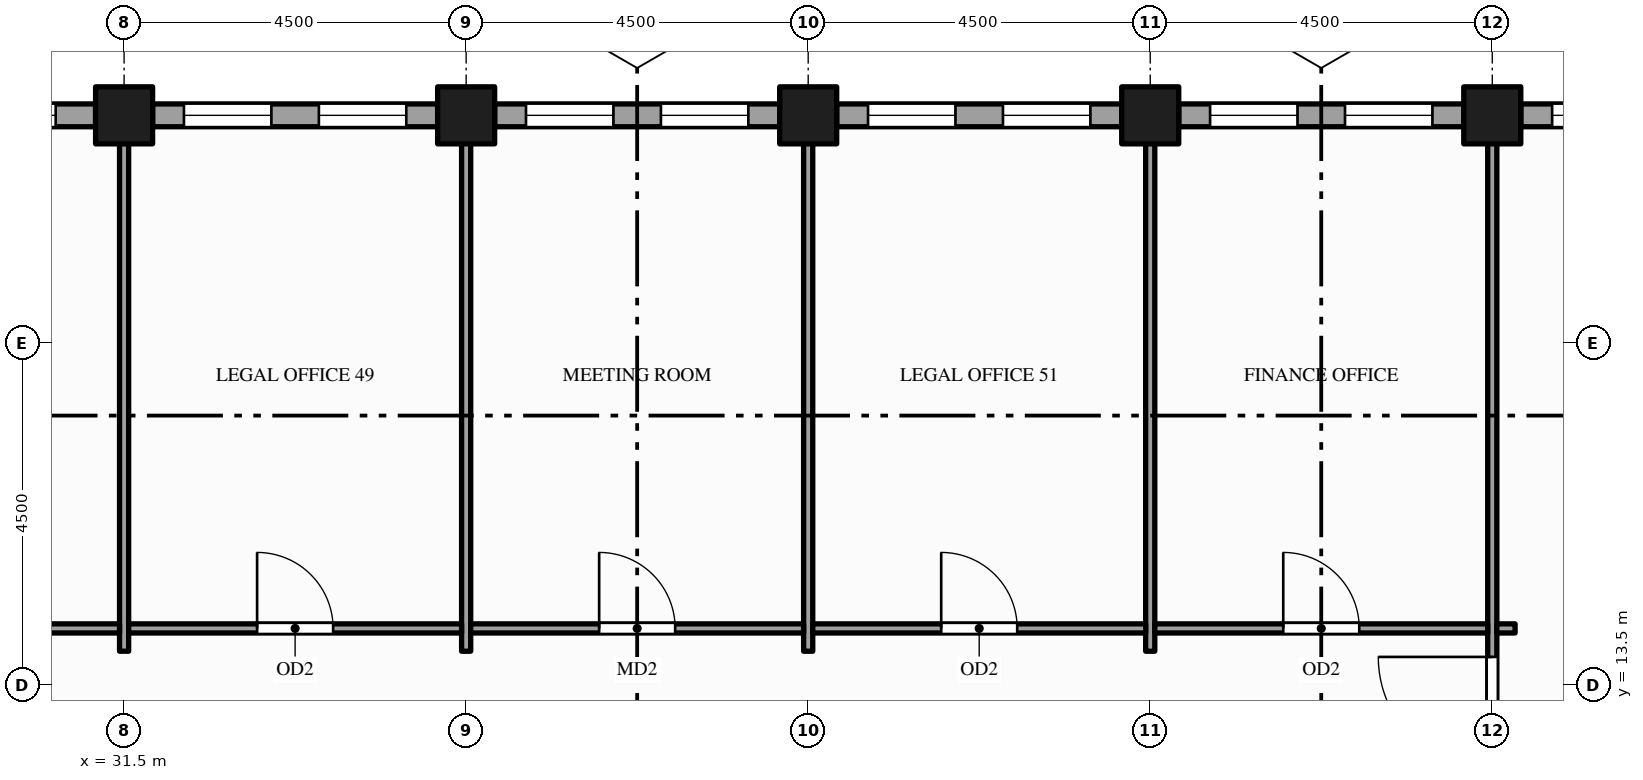
"""IFC4 building model, lengths in metres.
Left out: names, types, materials, properties, quantities, classifications, styles, units other than length and angle.
Written with IfcOpenShell. Run it as: python <this file> out.ifc"""

import sys

from ifc_helpers import new_model, si_unit, direction, frame, frame_2d, origin, origin_2d, place, context, subcontext, project, spatial, rectangle, hollow_rectangle, extrude, element, fill, save


model = new_model("IFC4")
c1 = context("Model", 3, precision=1e-05, world=origin(), true_north=direction((0.0, 1.0)))
c2 = subcontext(c1, "Body", "Model", "MODEL_VIEW")
j1 = project(units=[si_unit("LENGTHUNIT", "METRE"), si_unit("PLANEANGLEUNIT", "RADIAN")], contexts=[c1])
p1 = place(None, origin())
s1 = spatial("IfcSite", under=j1, at=p1, CompositionType="ELEMENT")
p2 = place(p1, origin())
s2 = spatial("IfcBuilding", under=s1, at=p2, CompositionType="ELEMENT")
p3 = place(p2, frame((0.0, 0.0, 235.0)))
s3 = spatial("IfcBuildingStorey", under=s2, at=p3, CompositionType="ELEMENT", Elevation=235.0)
for number, where, z_axis, x_axis in (
    (1, (31.5, 21.0, -0.15), (0.0, 0.0, 1.0), (1.0, 0.0, 0.0)),
    (2, (36.0, 21.0, -0.15), (0.0, 0.0, 1.0), (1.0, 0.0, 0.0)),
    (3, (40.5, 21.0, -0.15), (0.0, 0.0, 1.0), (1.0, 0.0, 0.0)),
    (4, (45.0, 21.0, -0.15), (0.0, 0.0, 1.0), (1.0, 0.0, 0.0)),
    (5, (49.5, 21.0, -0.15), (0.0, 0.0, 1.0), (1.0, 0.0, 0.0)),
):
    element("IfcColumn", number, at=place(p3, frame(where, z_axis=z_axis, x_axis=x_axis)), inside=s3, PredefinedType="COLUMN", context=c2, shape_type="SweptSolid", body=[
        extrude(hollow_rectangle(XDim=0.75, YDim=0.75, WallThickness=0.036, at=origin_2d()), origin(), (0.0, 0.0, 1.0), 4.0),
    ])
p4 = place(p3, frame((54.0, 21.0, 0.0), z_axis=(0.0, 0.0, 1.0), x_axis=(-1.0, 0.0, 0.0)))
e6 = element("IfcWall", 6, at=p4, inside=s3, PredefinedType="STANDARD", context=c2, shape_type="SweptSolid", body=[
    extrude(rectangle(XDim=4.125, YDim=0.3, at=frame_2d((2.062, 0.0))), origin(), (0.0, 0.0, 1.0), 2.87),
])
p5 = place(p4, frame((0.4, 0.0, 0.9)))
e7 = element("IfcOpeningElement", 7, at=p5, cuts=e6, PredefinedType="OPENING", context=c2, shape_type="SweptSolid", body=[
    extrude(rectangle(XDim=1.55, YDim=1.75, at=frame_2d((0.775, 0.875))), frame((0.0, 0.16, 0.0), z_axis=(0.0, -1.0, 0.0), x_axis=(1.0, 0.0, 0.0)), (0.0, 0.0, 1.0), 0.32),
])
p6 = place(p4, frame((2.562, 0.0, 0.9)))
e8 = element("IfcOpeningElement", 8, at=p6, cuts=e6, PredefinedType="OPENING", context=c2, shape_type="SweptSolid", body=[
    extrude(rectangle(XDim=1.15, YDim=1.75, at=frame_2d((0.575, 0.875))), frame((0.0, 0.16, 0.0), z_axis=(0.0, -1.0, 0.0), x_axis=(1.0, 0.0, 0.0)), (0.0, 0.0, 1.0), 0.32),
])
p7 = place(p3, frame((49.125, 21.0, 0.0), z_axis=(0.0, 0.0, 1.0), x_axis=(-1.0, 0.0, 0.0)))
e9 = element("IfcWall", 9, at=p7, inside=s3, PredefinedType="STANDARD", context=c2, shape_type="SweptSolid", body=[
    extrude(rectangle(XDim=3.75, YDim=0.3, at=frame_2d((1.875, 0.0))), origin(), (0.0, 0.0, 1.0), 2.87),
])
p8 = place(p7, frame((0.413, 0.0, 0.9)))
e10 = element("IfcOpeningElement", 10, at=p8, cuts=e9, PredefinedType="OPENING", context=c2, shape_type="SweptSolid", body=[
    extrude(rectangle(XDim=1.15, YDim=1.75, at=frame_2d((0.575, 0.875))), frame((0.0, 0.16, 0.0), z_axis=(0.0, -1.0, 0.0), x_axis=(1.0, 0.0, 0.0)), (0.0, 0.0, 1.0), 0.32),
])
p9 = place(p7, frame((2.188, 0.0, 0.9)))
e11 = element("IfcOpeningElement", 11, at=p9, cuts=e9, PredefinedType="OPENING", context=c2, shape_type="SweptSolid", body=[
    extrude(rectangle(XDim=1.15, YDim=1.75, at=frame_2d((0.575, 0.875))), frame((0.0, 0.16, 0.0), z_axis=(0.0, -1.0, 0.0), x_axis=(1.0, 0.0, 0.0)), (0.0, 0.0, 1.0), 0.32),
])
p10 = place(p3, frame((44.625, 21.0, 0.0), z_axis=(0.0, 0.0, 1.0), x_axis=(-1.0, 0.0, 0.0)))
e12 = element("IfcWall", 12, at=p10, inside=s3, PredefinedType="STANDARD", context=c2, shape_type="SweptSolid", body=[
    extrude(rectangle(XDim=3.75, YDim=0.3, at=frame_2d((1.875, 0.0))), origin(), (0.0, 0.0, 1.0), 2.87),
])
p11 = place(p10, frame((0.413, 0.0, 0.9)))
e13 = element("IfcOpeningElement", 13, at=p11, cuts=e12, PredefinedType="OPENING", context=c2, shape_type="SweptSolid", body=[
    extrude(rectangle(XDim=1.15, YDim=1.75, at=frame_2d((0.575, 0.875))), frame((0.0, 0.16, 0.0), z_axis=(0.0, -1.0, 0.0), x_axis=(1.0, 0.0, 0.0)), (0.0, 0.0, 1.0), 0.32),
])
p12 = place(p10, frame((2.188, 0.0, 0.9)))
e14 = element("IfcOpeningElement", 14, at=p12, cuts=e12, PredefinedType="OPENING", context=c2, shape_type="SweptSolid", body=[
    extrude(rectangle(XDim=1.15, YDim=1.75, at=frame_2d((0.575, 0.875))), frame((0.0, 0.16, 0.0), z_axis=(0.0, -1.0, 0.0), x_axis=(1.0, 0.0, 0.0)), (0.0, 0.0, 1.0), 0.32),
])
p13 = place(p3, frame((40.125, 21.0, 0.0), z_axis=(0.0, 0.0, 1.0), x_axis=(-1.0, 0.0, 0.0)))
e15 = element("IfcWall", 15, at=p13, inside=s3, PredefinedType="STANDARD", context=c2, shape_type="SweptSolid", body=[
    extrude(rectangle(XDim=3.75, YDim=0.3, at=frame_2d((1.875, 0.0))), origin(), (0.0, 0.0, 1.0), 2.87),
])
p14 = place(p13, frame((0.413, 0.0, 0.9)))
e16 = element("IfcOpeningElement", 16, at=p14, cuts=e15, PredefinedType="OPENING", context=c2, shape_type="SweptSolid", body=[
    extrude(rectangle(XDim=1.15, YDim=1.75, at=frame_2d((0.575, 0.875))), frame((0.0, 0.16, 0.0), z_axis=(0.0, -1.0, 0.0), x_axis=(1.0, 0.0, 0.0)), (0.0, 0.0, 1.0), 0.32),
])
p15 = place(p13, frame((2.188, 0.0, 0.9)))
e17 = element("IfcOpeningElement", 17, at=p15, cuts=e15, PredefinedType="OPENING", context=c2, shape_type="SweptSolid", body=[
    extrude(rectangle(XDim=1.15, YDim=1.75, at=frame_2d((0.575, 0.875))), frame((0.0, 0.16, 0.0), z_axis=(0.0, -1.0, 0.0), x_axis=(1.0, 0.0, 0.0)), (0.0, 0.0, 1.0), 0.32),
])
p16 = place(p3, frame((35.625, 21.0, 0.0), z_axis=(0.0, 0.0, 1.0), x_axis=(-1.0, 0.0, 0.0)))
e18 = element("IfcWall", 18, at=p16, inside=s3, PredefinedType="STANDARD", context=c2, shape_type="SweptSolid", body=[
    extrude(rectangle(XDim=3.75, YDim=0.3, at=frame_2d((1.875, 0.0))), origin(), (0.0, 0.0, 1.0), 2.87),
])
p17 = place(p16, frame((0.413, 0.0, 0.9)))
e19 = element("IfcOpeningElement", 19, at=p17, cuts=e18, PredefinedType="OPENING", context=c2, shape_type="SweptSolid", body=[
    extrude(rectangle(XDim=1.15, YDim=1.75, at=frame_2d((0.575, 0.875))), frame((0.0, 0.16, 0.0), z_axis=(0.0, -1.0, 0.0), x_axis=(1.0, 0.0, 0.0)), (0.0, 0.0, 1.0), 0.32),
])
p18 = place(p16, frame((2.188, 0.0, 0.9)))
e20 = element("IfcOpeningElement", 20, at=p18, cuts=e18, PredefinedType="OPENING", context=c2, shape_type="SweptSolid", body=[
    extrude(rectangle(XDim=1.15, YDim=1.75, at=frame_2d((0.575, 0.875))), frame((0.0, 0.16, 0.0), z_axis=(0.0, -1.0, 0.0), x_axis=(1.0, 0.0, 0.0)), (0.0, 0.0, 1.0), 0.32),
])
p19 = place(p3, frame((31.125, 21.0, 0.0), z_axis=(0.0, 0.0, 1.0), x_axis=(-1.0, 0.0, 0.0)))
e21 = element("IfcWall", 21, at=p19, inside=s3, PredefinedType="STANDARD", context=c2, shape_type="SweptSolid", body=[
    extrude(rectangle(XDim=2.25, YDim=0.3, at=frame_2d((1.125, 0.0))), origin(), (0.0, 0.0, 1.0), 2.87),
])
p20 = place(p19, frame((0.525, 0.0, 0.9)))
e22 = element("IfcOpeningElement", 22, at=p20, cuts=e21, PredefinedType="OPENING", context=c2, shape_type="SweptSolid", body=[
    extrude(rectangle(XDim=1.2, YDim=1.75, at=frame_2d((0.6, 0.875))), frame((0.0, 0.16, 0.0), z_axis=(0.0, -1.0, 0.0), x_axis=(1.0, 0.0, 0.0)), (0.0, 0.0, 1.0), 0.32),
])
for number, where, z_axis, x_axis in (
    (23, (31.5, 13.95, 0.0), (0.0, 0.0, 1.0), (0.0, 1.0, 0.0)),
    (24, (36.0, 13.95, 0.0), (0.0, 0.0, 1.0), (0.0, 1.0, 0.0)),
    (25, (40.5, 13.95, 0.0), (0.0, 0.0, 1.0), (0.0, 1.0, 0.0)),
    (26, (45.0, 13.95, 0.0), (0.0, 0.0, 1.0), (0.0, 1.0, 0.0)),
):
    element("IfcWall", number, at=place(p3, frame(where, z_axis=z_axis, x_axis=x_axis)), inside=s3, PredefinedType="PARTITIONING", context=c2, shape_type="SweptSolid", body=[
        extrude(rectangle(XDim=6.9, YDim=0.12, at=frame_2d((3.45, 0.0))), origin(), (0.0, 0.0, 1.0), 2.87),
    ])
p21 = place(p3, frame((49.5, -1.35, 0.0), z_axis=(0.0, 0.0, 1.0), x_axis=(0.0, 1.0, 0.0)))
e27 = element("IfcWall", 27, at=p21, inside=s3, PredefinedType="PARTITIONING", context=c2, shape_type="SweptSolid", body=[
    extrude(rectangle(XDim=22.2, YDim=0.12, at=frame_2d((11.1, 0.0))), origin(), (0.0, 0.0, 1.0), 2.87),
])
p22 = place(p21, frame((6.975, 0.0, 0.0)))
e28 = element("IfcOpeningElement", 28, at=p22, cuts=e27, PredefinedType="OPENING", context=c2, shape_type="SweptSolid", body=[
    extrude(rectangle(XDim=1.5, YDim=2.1, at=frame_2d((0.75, 1.05))), frame((0.0, 0.07, 0.0), z_axis=(0.0, -1.0, 0.0), x_axis=(1.0, 0.0, 0.0)), (0.0, 0.0, 1.0), 0.14),
])
p23 = place(p21, frame((13.725, 0.0, 0.0)))
e29 = element("IfcOpeningElement", 29, at=p23, cuts=e27, PredefinedType="OPENING", context=c2, shape_type="SweptSolid", body=[
    extrude(rectangle(XDim=1.5, YDim=2.1, at=frame_2d((0.75, 1.05))), frame((0.0, 0.07, 0.0), z_axis=(0.0, -1.0, 0.0), x_axis=(1.0, 0.0, 0.0)), (0.0, 0.0, 1.0), 0.14),
])
p24 = place(p21, frame((9.29, 0.0, 0.0)))
e30 = element("IfcOpeningElement", 30, at=p24, cuts=e27, PredefinedType="OPENING", context=c2, shape_type="SweptSolid", body=[
    extrude(rectangle(XDim=0.9, YDim=2.1, at=frame_2d((0.45, 1.05))), frame((0.0, 0.07, 0.0), z_axis=(0.0, -1.0, 0.0), x_axis=(1.0, 0.0, 0.0)), (0.0, 0.0, 1.0), 0.14),
])
p25 = place(p21, frame((10.65, 0.0, 0.0)))
e31 = element("IfcOpeningElement", 31, at=p25, cuts=e27, PredefinedType="OPENING", context=c2, shape_type="SweptSolid", body=[
    extrude(rectangle(XDim=0.9, YDim=2.1, at=frame_2d((0.45, 1.05))), frame((0.0, 0.07, 0.0), z_axis=(0.0, -1.0, 0.0), x_axis=(1.0, 0.0, 0.0)), (0.0, 0.0, 1.0), 0.14),
])
p26 = place(p21, frame((12.01, 0.0, 0.0)))
e32 = element("IfcOpeningElement", 32, at=p26, cuts=e27, PredefinedType="OPENING", context=c2, shape_type="SweptSolid", body=[
    extrude(rectangle(XDim=1.0, YDim=2.1, at=frame_2d((0.5, 1.05))), frame((0.0, 0.07, 0.0), z_axis=(0.0, -1.0, 0.0), x_axis=(1.0, 0.0, 0.0)), (0.0, 0.0, 1.0), 0.14),
])
p27 = place(p3, frame((27.06, 14.25, 0.0), z_axis=(0.0, 0.0, 1.0), x_axis=(1.0, 0.0, 0.0)))
e33 = element("IfcWall", 33, at=p27, inside=s3, PredefinedType="PARTITIONING", context=c2, shape_type="SweptSolid", body=[
    extrude(rectangle(XDim=4.38, YDim=0.12, at=frame_2d((2.19, 0.0))), origin(), (0.0, 0.0, 1.0), 2.87),
])
p28 = place(p27, frame((1.69, 0.0, 0.0)))
e34 = element("IfcOpeningElement", 34, at=p28, cuts=e33, PredefinedType="OPENING", context=c2, shape_type="SweptSolid", body=[
    extrude(rectangle(XDim=1.0, YDim=2.1, at=frame_2d((0.5, 1.05))), frame((0.0, 0.07, 0.0), z_axis=(0.0, -1.0, 0.0), x_axis=(1.0, 0.0, 0.0)), (0.0, 0.0, 1.0), 0.14),
])
p29 = place(p3, frame((31.56, 14.25, 0.0), z_axis=(0.0, 0.0, 1.0), x_axis=(1.0, 0.0, 0.0)))
e35 = element("IfcWall", 35, at=p29, inside=s3, PredefinedType="PARTITIONING", context=c2, shape_type="SweptSolid", body=[
    extrude(rectangle(XDim=4.38, YDim=0.12, at=frame_2d((2.19, 0.0))), origin(), (0.0, 0.0, 1.0), 2.87),
])
p30 = place(p29, frame((1.69, 0.0, 0.0)))
e36 = element("IfcOpeningElement", 36, at=p30, cuts=e35, PredefinedType="OPENING", context=c2, shape_type="SweptSolid", body=[
    extrude(rectangle(XDim=1.0, YDim=2.1, at=frame_2d((0.5, 1.05))), frame((0.0, 0.07, 0.0), z_axis=(0.0, -1.0, 0.0), x_axis=(1.0, 0.0, 0.0)), (0.0, 0.0, 1.0), 0.14),
])
p31 = place(p3, frame((36.06, 14.25, 0.0), z_axis=(0.0, 0.0, 1.0), x_axis=(1.0, 0.0, 0.0)))
e37 = element("IfcWall", 37, at=p31, inside=s3, PredefinedType="PARTITIONING", context=c2, shape_type="SweptSolid", body=[
    extrude(rectangle(XDim=4.38, YDim=0.12, at=frame_2d((2.19, 0.0))), origin(), (0.0, 0.0, 1.0), 2.87),
])
p32 = place(p31, frame((1.69, 0.0, 0.0)))
e38 = element("IfcOpeningElement", 38, at=p32, cuts=e37, PredefinedType="OPENING", context=c2, shape_type="SweptSolid", body=[
    extrude(rectangle(XDim=1.0, YDim=2.1, at=frame_2d((0.5, 1.05))), frame((0.0, 0.07, 0.0), z_axis=(0.0, -1.0, 0.0), x_axis=(1.0, 0.0, 0.0)), (0.0, 0.0, 1.0), 0.14),
])
p33 = place(p3, frame((40.56, 14.25, 0.0), z_axis=(0.0, 0.0, 1.0), x_axis=(1.0, 0.0, 0.0)))
e39 = element("IfcWall", 39, at=p33, inside=s3, PredefinedType="PARTITIONING", context=c2, shape_type="SweptSolid", body=[
    extrude(rectangle(XDim=4.38, YDim=0.12, at=frame_2d((2.19, 0.0))), origin(), (0.0, 0.0, 1.0), 2.87),
])
p34 = place(p33, frame((1.69, 0.0, 0.0)))
e40 = element("IfcOpeningElement", 40, at=p34, cuts=e39, PredefinedType="OPENING", context=c2, shape_type="SweptSolid", body=[
    extrude(rectangle(XDim=1.0, YDim=2.1, at=frame_2d((0.5, 1.05))), frame((0.0, 0.07, 0.0), z_axis=(0.0, -1.0, 0.0), x_axis=(1.0, 0.0, 0.0)), (0.0, 0.0, 1.0), 0.14),
])
p35 = place(p3, frame((45.06, 14.25, 0.0), z_axis=(0.0, 0.0, 1.0), x_axis=(1.0, 0.0, 0.0)))
e41 = element("IfcWall", 41, at=p35, inside=s3, PredefinedType="PARTITIONING", context=c2, shape_type="SweptSolid", body=[
    extrude(rectangle(XDim=4.38, YDim=0.12, at=frame_2d((2.19, 0.0))), origin(), (0.0, 0.0, 1.0), 2.87),
])
p36 = place(p35, frame((1.69, 0.0, 0.0)))
e42 = element("IfcOpeningElement", 42, at=p36, cuts=e41, PredefinedType="OPENING", context=c2, shape_type="SweptSolid", body=[
    extrude(rectangle(XDim=1.0, YDim=2.1, at=frame_2d((0.5, 1.05))), frame((0.0, 0.07, 0.0), z_axis=(0.0, -1.0, 0.0), x_axis=(1.0, 0.0, 0.0)), (0.0, 0.0, 1.0), 0.14),
])
p37 = place(p3, frame((49.56, 14.25, 0.0), z_axis=(0.0, 0.0, 1.0), x_axis=(1.0, 0.0, 0.0)))
e43 = element("IfcWall", 43, at=p37, inside=s3, PredefinedType="PARTITIONING", context=c2, shape_type="SweptSolid", body=[
    extrude(rectangle(XDim=0.24, YDim=0.12, at=frame_2d((0.12, 0.0))), origin(), (0.0, 0.0, 1.0), 2.87),
])
p38 = place(p6, origin())
e44 = element("IfcWindow", 44, at=p38, inside=s3, PartitioningType="SINGLE_PANEL", PredefinedType="WINDOW", context=c2, shape_type="SweptSolid", body=[
    extrude(rectangle(XDim=1.15, YDim=1.75, at=frame_2d((0.575, 0.875))), frame((0.0, 0.03, 0.0), z_axis=(0.0, -1.0, 0.0), x_axis=(1.0, 0.0, 0.0)), (0.0, 0.0, 1.0), 0.06),
])
fill(e8, e44)
p39 = place(p8, origin())
e45 = element("IfcWindow", 45, at=p39, inside=s3, PartitioningType="SINGLE_PANEL", PredefinedType="WINDOW", context=c2, shape_type="SweptSolid", body=[
    extrude(rectangle(XDim=1.15, YDim=1.75, at=frame_2d((0.575, 0.875))), frame((0.0, 0.03, 0.0), z_axis=(0.0, -1.0, 0.0), x_axis=(1.0, 0.0, 0.0)), (0.0, 0.0, 1.0), 0.06),
])
fill(e10, e45)
p40 = place(p9, origin())
e46 = element("IfcWindow", 46, at=p40, inside=s3, PartitioningType="SINGLE_PANEL", PredefinedType="WINDOW", context=c2, shape_type="SweptSolid", body=[
    extrude(rectangle(XDim=1.15, YDim=1.75, at=frame_2d((0.575, 0.875))), frame((0.0, 0.03, 0.0), z_axis=(0.0, -1.0, 0.0), x_axis=(1.0, 0.0, 0.0)), (0.0, 0.0, 1.0), 0.06),
])
fill(e11, e46)
p41 = place(p11, origin())
e47 = element("IfcWindow", 47, at=p41, inside=s3, PartitioningType="SINGLE_PANEL", PredefinedType="WINDOW", context=c2, shape_type="SweptSolid", body=[
    extrude(rectangle(XDim=1.15, YDim=1.75, at=frame_2d((0.575, 0.875))), frame((0.0, 0.03, 0.0), z_axis=(0.0, -1.0, 0.0), x_axis=(1.0, 0.0, 0.0)), (0.0, 0.0, 1.0), 0.06),
])
fill(e13, e47)
p42 = place(p12, origin())
e48 = element("IfcWindow", 48, at=p42, inside=s3, PartitioningType="SINGLE_PANEL", PredefinedType="WINDOW", context=c2, shape_type="SweptSolid", body=[
    extrude(rectangle(XDim=1.15, YDim=1.75, at=frame_2d((0.575, 0.875))), frame((0.0, 0.03, 0.0), z_axis=(0.0, -1.0, 0.0), x_axis=(1.0, 0.0, 0.0)), (0.0, 0.0, 1.0), 0.06),
])
fill(e14, e48)
p43 = place(p14, origin())
e49 = element("IfcWindow", 49, at=p43, inside=s3, PartitioningType="SINGLE_PANEL", PredefinedType="WINDOW", context=c2, shape_type="SweptSolid", body=[
    extrude(rectangle(XDim=1.15, YDim=1.75, at=frame_2d((0.575, 0.875))), frame((0.0, 0.03, 0.0), z_axis=(0.0, -1.0, 0.0), x_axis=(1.0, 0.0, 0.0)), (0.0, 0.0, 1.0), 0.06),
])
fill(e16, e49)
p44 = place(p15, origin())
e50 = element("IfcWindow", 50, at=p44, inside=s3, PartitioningType="SINGLE_PANEL", PredefinedType="WINDOW", context=c2, shape_type="SweptSolid", body=[
    extrude(rectangle(XDim=1.15, YDim=1.75, at=frame_2d((0.575, 0.875))), frame((0.0, 0.03, 0.0), z_axis=(0.0, -1.0, 0.0), x_axis=(1.0, 0.0, 0.0)), (0.0, 0.0, 1.0), 0.06),
])
fill(e17, e50)
p45 = place(p17, origin())
e51 = element("IfcWindow", 51, at=p45, inside=s3, PartitioningType="SINGLE_PANEL", PredefinedType="WINDOW", context=c2, shape_type="SweptSolid", body=[
    extrude(rectangle(XDim=1.15, YDim=1.75, at=frame_2d((0.575, 0.875))), frame((0.0, 0.03, 0.0), z_axis=(0.0, -1.0, 0.0), x_axis=(1.0, 0.0, 0.0)), (0.0, 0.0, 1.0), 0.06),
])
fill(e19, e51)
p46 = place(p18, origin())
e52 = element("IfcWindow", 52, at=p46, inside=s3, PartitioningType="SINGLE_PANEL", PredefinedType="WINDOW", context=c2, shape_type="SweptSolid", body=[
    extrude(rectangle(XDim=1.15, YDim=1.75, at=frame_2d((0.575, 0.875))), frame((0.0, 0.03, 0.0), z_axis=(0.0, -1.0, 0.0), x_axis=(1.0, 0.0, 0.0)), (0.0, 0.0, 1.0), 0.06),
])
fill(e20, e52)
p47 = place(p20, origin())
e53 = element("IfcWindow", 53, at=p47, inside=s3, PartitioningType="SINGLE_PANEL", PredefinedType="WINDOW", context=c2, shape_type="SweptSolid", body=[
    extrude(rectangle(XDim=1.2, YDim=1.75, at=frame_2d((0.6, 0.875))), frame((0.0, 0.03, 0.0), z_axis=(0.0, -1.0, 0.0), x_axis=(1.0, 0.0, 0.0)), (0.0, 0.0, 1.0), 0.06),
])
fill(e22, e53)
p48 = place(p23, origin())
e54 = element("IfcDoor", 54, at=p48, inside=s3, OperationType="SINGLE_SWING_RIGHT", PredefinedType="DOOR", context=c2, shape_type="SweptSolid", body=[
    extrude(rectangle(XDim=1.5, YDim=2.1, at=frame_2d((0.75, 1.05))), frame((0.0, 0.025, 0.0), z_axis=(0.0, -1.0, 0.0), x_axis=(1.0, 0.0, 0.0)), (0.0, 0.0, 1.0), 0.05),
])
fill(e29, e54)
p49 = place(p30, origin())
e55 = element("IfcDoor", 55, at=p49, inside=s3, OperationType="SINGLE_SWING_LEFT", PredefinedType="DOOR", context=c2, shape_type="SweptSolid", body=[
    extrude(rectangle(XDim=1.0, YDim=2.1, at=frame_2d((0.5, 1.05))), frame((0.0, 0.025, 0.0), z_axis=(0.0, -1.0, 0.0), x_axis=(1.0, 0.0, 0.0)), (0.0, 0.0, 1.0), 0.05),
])
fill(e36, e55)
p50 = place(p32, origin())
e56 = element("IfcDoor", 56, at=p50, inside=s3, OperationType="SINGLE_SWING_LEFT", PredefinedType="DOOR", context=c2, shape_type="SweptSolid", body=[
    extrude(rectangle(XDim=1.0, YDim=2.1, at=frame_2d((0.5, 1.05))), frame((0.0, 0.025, 0.0), z_axis=(0.0, -1.0, 0.0), x_axis=(1.0, 0.0, 0.0)), (0.0, 0.0, 1.0), 0.05),
])
fill(e38, e56)
p51 = place(p34, origin())
e57 = element("IfcDoor", 57, at=p51, inside=s3, OperationType="SINGLE_SWING_LEFT", PredefinedType="DOOR", context=c2, shape_type="SweptSolid", body=[
    extrude(rectangle(XDim=1.0, YDim=2.1, at=frame_2d((0.5, 1.05))), frame((0.0, 0.025, 0.0), z_axis=(0.0, -1.0, 0.0), x_axis=(1.0, 0.0, 0.0)), (0.0, 0.0, 1.0), 0.05),
])
fill(e40, e57)
p52 = place(p36, origin())
e58 = element("IfcDoor", 58, at=p52, inside=s3, OperationType="SINGLE_SWING_LEFT", PredefinedType="DOOR", context=c2, shape_type="SweptSolid", body=[
    extrude(rectangle(XDim=1.0, YDim=2.1, at=frame_2d((0.5, 1.05))), frame((0.0, 0.025, 0.0), z_axis=(0.0, -1.0, 0.0), x_axis=(1.0, 0.0, 0.0)), (0.0, 0.0, 1.0), 0.05),
])
fill(e42, e58)
save(model, sys.argv[1])
